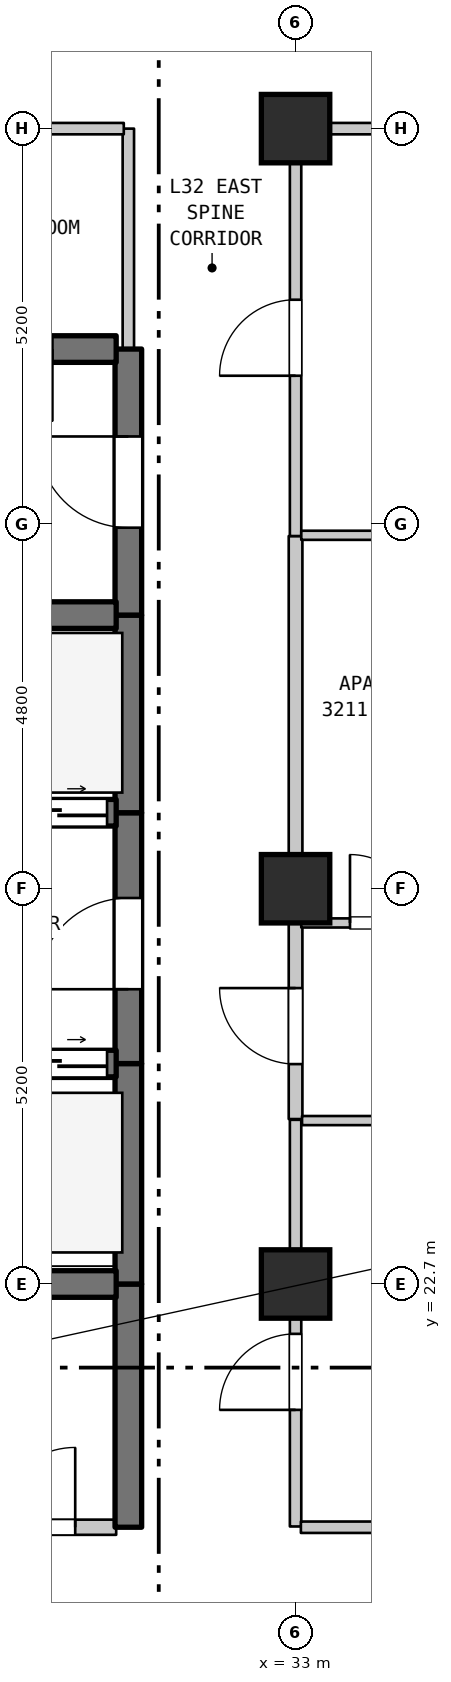
"""IFC4 building model, lengths in metres.
Left out: names, types, materials, properties, quantities, classifications, styles, units other than length and angle.
Written with IfcOpenShell. Run it as: python <this file> out.ifc"""

import sys

from ifc_helpers import new_model, si_unit, direction, frame, frame_2d, origin, origin_2d, place, context, subcontext, project, spatial, rectangle, extrude, element, fill, save


model = new_model("IFC4")
c1 = context("Model", 3, precision=1e-05, world=origin(), true_north=direction((0.0, 1.0)))
c2 = subcontext(c1, "Body", "Model", "MODEL_VIEW")
j1 = project(units=[si_unit("LENGTHUNIT", "METRE"), si_unit("PLANEANGLEUNIT", "RADIAN")], contexts=[c1])
p1 = place(None, origin())
s1 = spatial("IfcSite", under=j1, at=p1, CompositionType="ELEMENT")
p2 = place(p1, origin())
s2 = spatial("IfcBuilding", under=s1, at=p2, CompositionType="ELEMENT")
p3 = place(p2, frame((0.0, 0.0, 133.5)))
s3 = spatial("IfcBuildingStorey", under=s2, at=p3, CompositionType="ELEMENT", Elevation=133.5)
for number, where, z_axis, x_axis in (
    (1, (33.0, 22.7, 0.0), (0.0, 0.0, 1.0), (1.0, 0.0, 0.0)),
    (2, (33.0, 27.9, 0.0), (0.0, 0.0, 1.0), (1.0, 0.0, 0.0)),
    (3, (33.0, 37.9, 0.0), (0.0, 0.0, 1.0), (1.0, 0.0, 0.0)),
):
    element("IfcColumn", number, at=place(p3, frame(where, z_axis=z_axis, x_axis=x_axis)), inside=s3, PredefinedType="COLUMN", context=c2, shape_type="SweptSolid", body=[
        extrude(rectangle(XDim=0.9, YDim=0.9, at=origin_2d()), origin(), (0.0, 0.0, 1.0), 3.7),
    ])
p4 = place(p3, frame((30.8, 19.5, 0.0), z_axis=(0.0, 0.0, 1.0), x_axis=(0.0, 1.0, 0.0)))
e4 = element("IfcWall", 4, at=p4, inside=s3, PredefinedType="SHEAR", context=c2, shape_type="SweptSolid", body=[
    extrude(rectangle(XDim=3.2, YDim=0.35, at=frame_2d((1.6, 0.0))), origin(), (0.0, 0.0, 1.0), 3.385),
])
p5 = place(p3, frame((30.8, 22.7, 0.0), z_axis=(0.0, 0.0, 1.0), x_axis=(0.0, 1.0, 0.0)))
e5 = element("IfcWall", 5, at=p5, inside=s3, PredefinedType="SHEAR", context=c2, shape_type="SweptSolid", body=[
    extrude(rectangle(XDim=2.9, YDim=0.35, at=frame_2d((1.45, 0.0))), origin(), (0.0, 0.0, 1.0), 3.385),
])
p6 = place(p3, frame((30.8, 25.6, 0.0), z_axis=(0.0, 0.0, 1.0), x_axis=(0.0, 1.0, 0.0)))
e6 = element("IfcWall", 6, at=p6, inside=s3, PredefinedType="SHEAR", context=c2, shape_type="SweptSolid", body=[
    extrude(rectangle(XDim=3.3, YDim=0.35, at=frame_2d((1.65, 0.0))), origin(), (0.0, 0.0, 1.0), 3.385),
])
p7 = place(p6, frame((0.978, 0.0, 0.0)))
e7 = element("IfcOpeningElement", 7, at=p7, cuts=e6, PredefinedType="OPENING", context=c2, shape_type="SweptSolid", body=[
    extrude(rectangle(XDim=1.2, YDim=2.2, at=frame_2d((0.6, 1.1))), frame((0.0, 0.185, 0.0), z_axis=(0.0, -1.0, 0.0), x_axis=(1.0, 0.0, 0.0)), (0.0, 0.0, 1.0), 0.37),
])
p8 = place(p3, frame((30.8, 28.9, 0.0), z_axis=(0.0, 0.0, 1.0), x_axis=(0.0, 1.0, 0.0)))
e8 = element("IfcWall", 8, at=p8, inside=s3, PredefinedType="SHEAR", context=c2, shape_type="SweptSolid", body=[
    extrude(rectangle(XDim=2.6, YDim=0.35, at=frame_2d((1.3, 0.0))), origin(), (0.0, 0.0, 1.0), 3.385),
])
p9 = place(p3, frame((30.8, 31.5, 0.0), z_axis=(0.0, 0.0, 1.0), x_axis=(0.0, 1.0, 0.0)))
e9 = element("IfcWall", 9, at=p9, inside=s3, PredefinedType="SHEAR", context=c2, shape_type="SweptSolid", body=[
    extrude(rectangle(XDim=3.5, YDim=0.35, at=frame_2d((1.75, 0.0))), origin(), (0.0, 0.0, 1.0), 3.385),
])
p10 = place(p9, frame((1.15, 0.0, 0.0)))
e10 = element("IfcOpeningElement", 10, at=p10, cuts=e9, PredefinedType="OPENING", context=c2, shape_type="SweptSolid", body=[
    extrude(rectangle(XDim=1.2, YDim=2.2, at=frame_2d((0.6, 1.1))), frame((0.0, 0.185, 0.0), z_axis=(0.0, -1.0, 0.0), x_axis=(1.0, 0.0, 0.0)), (0.0, 0.0, 1.0), 0.37),
])
p11 = place(p3, frame((30.8, 35.0, 0.0), z_axis=(0.0, 0.0, 1.0), x_axis=(0.0, 1.0, 0.0)))
e11 = element("IfcWall", 11, at=p11, inside=s3, PredefinedType="STANDARD", context=c2, shape_type="SweptSolid", body=[
    extrude(rectangle(XDim=2.9, YDim=0.15, at=frame_2d((1.45, 0.0))), origin(), (0.0, 0.0, 1.0), 3.385),
])
p12 = place(p3, frame((33.0, 19.51, 0.0), z_axis=(0.0, 0.0, 1.0), x_axis=(0.0, 1.0, 0.0)))
e12 = element("IfcWall", 12, at=p12, inside=s3, PredefinedType="STANDARD", context=c2, shape_type="SweptSolid", body=[
    extrude(rectangle(XDim=5.35, YDim=0.15, at=frame_2d((2.675, 0.0))), origin(), (0.0, 0.0, 1.0), 2.935),
])
p13 = place(p12, frame((1.534, 0.0, 0.0)))
e13 = element("IfcOpeningElement", 13, at=p13, cuts=e12, PredefinedType="OPENING", context=c2, shape_type="SweptSolid", body=[
    extrude(rectangle(XDim=1.0, YDim=2.15, at=frame_2d((0.5, 1.075))), frame((0.0, 0.085, 0.0), z_axis=(0.0, -1.0, 0.0), x_axis=(1.0, 0.0, 0.0)), (0.0, 0.0, 1.0), 0.17),
])
p14 = place(p3, frame((33.0, 24.87, 0.0), z_axis=(0.0, 0.0, 1.0), x_axis=(0.0, 1.0, 0.0)))
e14 = element("IfcWall", 14, at=p14, inside=s3, PredefinedType="STANDARD", context=c2, shape_type="SweptSolid", body=[
    extrude(rectangle(XDim=2.6, YDim=0.18, at=frame_2d((1.3, 0.0))), origin(), (0.0, 0.0, 1.0), 2.935),
])
p15 = place(p14, frame((0.723, 0.0, 0.0)))
e15 = element("IfcOpeningElement", 15, at=p15, cuts=e14, PredefinedType="OPENING", context=c2, shape_type="SweptSolid", body=[
    extrude(rectangle(XDim=1.0, YDim=2.15, at=frame_2d((0.5, 1.075))), frame((0.0, 0.1, 0.0), z_axis=(0.0, -1.0, 0.0), x_axis=(1.0, 0.0, 0.0)), (0.0, 0.0, 1.0), 0.2),
])
p16 = place(p3, frame((33.0, 27.47, 0.0), z_axis=(0.0, 0.0, 1.0), x_axis=(0.0, 1.0, 0.0)))
e16 = element("IfcWall", 16, at=p16, inside=s3, PredefinedType="STANDARD", context=c2, shape_type="SweptSolid", body=[
    extrude(rectangle(XDim=5.07, YDim=0.18, at=frame_2d((2.535, 0.0))), origin(), (0.0, 0.0, 1.0), 2.885),
])
p17 = place(p3, frame((33.0, 32.54, 0.0), z_axis=(0.0, 0.0, 1.0), x_axis=(0.0, 1.0, 0.0)))
e17 = element("IfcWall", 17, at=p17, inside=s3, PredefinedType="STANDARD", context=c2, shape_type="SweptSolid", body=[
    extrude(rectangle(XDim=5.36, YDim=0.15, at=frame_2d((2.68, 0.0))), origin(), (0.0, 0.0, 1.0), 2.885),
])
p18 = place(p17, frame((2.109, 0.0, 0.0)))
e18 = element("IfcOpeningElement", 18, at=p18, cuts=e17, PredefinedType="OPENING", context=c2, shape_type="SweptSolid", body=[
    extrude(rectangle(XDim=1.0, YDim=2.15, at=frame_2d((0.5, 1.075))), frame((0.0, 0.085, 0.0), z_axis=(0.0, -1.0, 0.0), x_axis=(1.0, 0.0, 0.0)), (0.0, 0.0, 1.0), 0.17),
])
p19 = place(p3, frame((28.585, 19.5, 0.0), z_axis=(0.0, 0.0, 1.0), x_axis=(1.0, 0.0, 0.0)))
e19 = element("IfcWall", 19, at=p19, inside=s3, PredefinedType="STANDARD", context=c2, shape_type="SweptSolid", body=[
    extrude(rectangle(XDim=2.055, YDim=0.2, at=frame_2d((1.027, 0.0))), origin(), (0.0, 0.0, 1.0), 3.385),
])
p20 = place(p19, frame((0.466, 0.0, 0.0)))
e20 = element("IfcOpeningElement", 20, at=p20, cuts=e19, PredefinedType="OPENING", context=c2, shape_type="SweptSolid", body=[
    extrude(rectangle(XDim=1.05, YDim=2.15, at=frame_2d((0.525, 1.075))), frame((0.0, 0.11, 0.0), z_axis=(0.0, -1.0, 0.0), x_axis=(1.0, 0.0, 0.0)), (0.0, 0.0, 1.0), 0.22),
])
p21 = place(p3, frame((33.07, 19.5, 0.0), z_axis=(0.0, 0.0, 1.0), x_axis=(1.0, 0.0, 0.0)))
e21 = element("IfcWall", 21, at=p21, inside=s3, PredefinedType="STANDARD", context=c2, shape_type="SweptSolid", body=[
    extrude(rectangle(XDim=21.51, YDim=0.15, at=frame_2d((10.755, 0.0))), origin(), (0.0, 0.0, 1.0), 3.385),
])
p22 = place(p21, frame((10.185, 0.0, 0.0)))
e22 = element("IfcOpeningElement", 22, at=p22, cuts=e21, PredefinedType="OPENING", context=c2, shape_type="SweptSolid", body=[
    extrude(rectangle(XDim=1.0, YDim=2.15, at=frame_2d((0.5, 1.075))), frame((0.0, 0.085, 0.0), z_axis=(0.0, -1.0, 0.0), x_axis=(1.0, 0.0, 0.0)), (0.0, 0.0, 1.0), 0.17),
])
p23 = place(p3, frame((28.585, 22.7, 0.0), z_axis=(0.0, 0.0, 1.0), x_axis=(1.0, 0.0, 0.0)))
e23 = element("IfcWall", 23, at=p23, inside=s3, PredefinedType="SHEAR", context=c2, shape_type="SweptSolid", body=[
    extrude(rectangle(XDim=2.055, YDim=0.35, at=frame_2d((1.027, 0.0))), origin(), (0.0, 0.0, 1.0), 3.385),
])
p24 = place(p3, frame((33.085, 24.85, 0.0), z_axis=(0.0, 0.0, 1.0), x_axis=(1.0, 0.0, 0.0)))
e24 = element("IfcWall", 24, at=p24, inside=s3, PredefinedType="PARTITIONING", context=c2, shape_type="SweptSolid", body=[
    extrude(rectangle(XDim=23.905, YDim=0.12, at=frame_2d((11.953, 0.0))), origin(), (0.0, 0.0, 1.0), 3.385),
])
p25 = place(p3, frame((27.46, 25.6, 0.0), z_axis=(0.0, 0.0, 1.0), x_axis=(1.0, 0.0, 0.0)))
e25 = element("IfcWall", 25, at=p25, inside=s3, PredefinedType="SHEAR", context=c2, shape_type="SweptSolid", body=[
    extrude(rectangle(XDim=3.18, YDim=0.35, at=frame_2d((1.59, 0.0))), origin(), (0.0, 0.0, 1.0), 3.385),
])
p26 = place(p25, frame((0.12, 0.0, 0.0)))
e26 = element("IfcOpeningElement", 26, at=p26, cuts=e25, PredefinedType="OPENING", context=c2, shape_type="SweptSolid", body=[
    extrude(rectangle(XDim=1.25, YDim=2.2, at=frame_2d((0.625, 1.1))), frame((0.0, 0.185, 0.0), z_axis=(0.0, -1.0, 0.0), x_axis=(1.0, 0.0, 0.0)), (0.0, 0.0, 1.0), 0.37),
])
p27 = place(p25, frame((1.81, 0.0, 0.0)))
e27 = element("IfcOpeningElement", 27, at=p27, cuts=e25, PredefinedType="OPENING", context=c2, shape_type="SweptSolid", body=[
    extrude(rectangle(XDim=1.25, YDim=2.2, at=frame_2d((0.625, 1.1))), frame((0.0, 0.185, 0.0), z_axis=(0.0, -1.0, 0.0), x_axis=(1.0, 0.0, 0.0)), (0.0, 0.0, 1.0), 0.37),
])
p28 = place(p3, frame((33.075, 27.45, 0.0), z_axis=(0.0, 0.0, 1.0), x_axis=(1.0, 0.0, 0.0)))
e28 = element("IfcWall", 28, at=p28, inside=s3, PredefinedType="PARTITIONING", context=c2, shape_type="SweptSolid", body=[
    extrude(rectangle(XDim=2.364, YDim=0.12, at=frame_2d((1.182, 0.0))), origin(), (0.0, 0.0, 1.0), 3.385),
])
p29 = place(p28, frame((0.641, 0.0, 0.0)))
e29 = element("IfcOpeningElement", 29, at=p29, cuts=e28, PredefinedType="OPENING", context=c2, shape_type="SweptSolid", body=[
    extrude(rectangle(XDim=0.9, YDim=2.15, at=frame_2d((0.45, 1.075))), frame((0.0, 0.07, 0.0), z_axis=(0.0, -1.0, 0.0), x_axis=(1.0, 0.0, 0.0)), (0.0, 0.0, 1.0), 0.14),
])
p30 = place(p3, frame((27.46, 28.9, 0.0), z_axis=(0.0, 0.0, 1.0), x_axis=(1.0, 0.0, 0.0)))
e30 = element("IfcWall", 30, at=p30, inside=s3, PredefinedType="SHEAR", context=c2, shape_type="SweptSolid", body=[
    extrude(rectangle(XDim=3.18, YDim=0.35, at=frame_2d((1.59, 0.0))), origin(), (0.0, 0.0, 1.0), 3.385),
])
p31 = place(p30, frame((0.12, 0.0, 0.0)))
e31 = element("IfcOpeningElement", 31, at=p31, cuts=e30, PredefinedType="OPENING", context=c2, shape_type="SweptSolid", body=[
    extrude(rectangle(XDim=1.25, YDim=2.2, at=frame_2d((0.625, 1.1))), frame((0.0, 0.185, 0.0), z_axis=(0.0, -1.0, 0.0), x_axis=(1.0, 0.0, 0.0)), (0.0, 0.0, 1.0), 0.37),
])
p32 = place(p30, frame((1.81, 0.0, 0.0)))
e32 = element("IfcOpeningElement", 32, at=p32, cuts=e30, PredefinedType="OPENING", context=c2, shape_type="SweptSolid", body=[
    extrude(rectangle(XDim=1.25, YDim=2.2, at=frame_2d((0.625, 1.1))), frame((0.0, 0.185, 0.0), z_axis=(0.0, -1.0, 0.0), x_axis=(1.0, 0.0, 0.0)), (0.0, 0.0, 1.0), 0.37),
])
p33 = place(p3, frame((27.46, 31.5, 0.0), z_axis=(0.0, 0.0, 1.0), x_axis=(1.0, 0.0, 0.0)))
e33 = element("IfcWall", 33, at=p33, inside=s3, PredefinedType="SHEAR", context=c2, shape_type="SweptSolid", body=[
    extrude(rectangle(XDim=3.18, YDim=0.35, at=frame_2d((1.59, 0.0))), origin(), (0.0, 0.0, 1.0), 3.385),
])
p34 = place(p3, frame((33.075, 32.55, 0.0), z_axis=(0.0, 0.0, 1.0), x_axis=(1.0, 0.0, 0.0)))
e34 = element("IfcWall", 34, at=p34, inside=s3, PredefinedType="PARTITIONING", context=c2, shape_type="SweptSolid", body=[
    extrude(rectangle(XDim=2.364, YDim=0.12, at=frame_2d((1.182, 0.0))), origin(), (0.0, 0.0, 1.0), 3.385),
])
p35 = place(p3, frame((28.045, 35.0, 0.0), z_axis=(0.0, 0.0, 1.0), x_axis=(1.0, 0.0, 0.0)))
e35 = element("IfcWall", 35, at=p35, inside=s3, PredefinedType="SHEAR", context=c2, shape_type="SweptSolid", body=[
    extrude(rectangle(XDim=2.595, YDim=0.35, at=frame_2d((1.297, 0.0))), origin(), (0.0, 0.0, 1.0), 3.385),
])
p36 = place(p35, frame((0.806, 0.0, 0.0)))
e36 = element("IfcOpeningElement", 36, at=p36, cuts=e35, PredefinedType="OPENING", context=c2, shape_type="SweptSolid", body=[
    extrude(rectangle(XDim=0.95, YDim=2.15, at=frame_2d((0.475, 1.075))), frame((0.0, 0.185, 0.0), z_axis=(0.0, -1.0, 0.0), x_axis=(1.0, 0.0, 0.0)), (0.0, 0.0, 1.0), 0.37),
])
p37 = place(p3, frame((28.045, 37.9, 0.0), z_axis=(0.0, 0.0, 1.0), x_axis=(1.0, 0.0, 0.0)))
e37 = element("IfcWall", 37, at=p37, inside=s3, PredefinedType="STANDARD", context=c2, shape_type="SweptSolid", body=[
    extrude(rectangle(XDim=2.695, YDim=0.15, at=frame_2d((1.348, 0.0))), origin(), (0.0, 0.0, 1.0), 2.885),
])
p38 = place(p3, frame((33.06, 37.9, 0.0), z_axis=(0.0, 0.0, 1.0), x_axis=(1.0, 0.0, 0.0)))
e38 = element("IfcWall", 38, at=p38, inside=s3, PredefinedType="STANDARD", context=c2, shape_type="SweptSolid", body=[
    extrude(rectangle(XDim=11.879, YDim=0.15, at=frame_2d((5.939, 0.0))), origin(), (0.0, 0.0, 1.0), 3.385),
])
p39 = place(p38, frame((5.439, 0.0, 0.0)))
e39 = element("IfcOpeningElement", 39, at=p39, cuts=e38, PredefinedType="OPENING", context=c2, shape_type="SweptSolid", body=[
    extrude(rectangle(XDim=1.0, YDim=2.15, at=frame_2d((0.5, 1.075))), frame((0.0, 0.085, 0.0), z_axis=(0.0, -1.0, 0.0), x_axis=(1.0, 0.0, 0.0)), (0.0, 0.0, 1.0), 0.17),
])
p40 = place(p7, origin())
e40 = element("IfcDoor", 40, at=p40, inside=s3, OperationType="SINGLE_SWING_LEFT", PredefinedType="DOOR", context=c2, shape_type="SweptSolid", body=[
    extrude(rectangle(XDim=1.2, YDim=2.2, at=frame_2d((0.6, 1.1))), frame((0.0, 0.025, 0.0), z_axis=(0.0, -1.0, 0.0), x_axis=(1.0, 0.0, 0.0)), (0.0, 0.0, 1.0), 0.05),
])
fill(e7, e40)
p41 = place(p10, origin())
e41 = element("IfcDoor", 41, at=p41, inside=s3, OperationType="SINGLE_SWING_RIGHT", PredefinedType="DOOR", context=c2, shape_type="SweptSolid", body=[
    extrude(rectangle(XDim=1.2, YDim=2.2, at=frame_2d((0.6, 1.1))), frame((0.0, 0.025, 0.0), z_axis=(0.0, -1.0, 0.0), x_axis=(1.0, 0.0, 0.0)), (0.0, 0.0, 1.0), 0.05),
])
fill(e10, e41)
p42 = place(p13, origin())
e42 = element("IfcDoor", 42, at=p42, inside=s3, OperationType="SINGLE_SWING_LEFT", PredefinedType="DOOR", context=c2, shape_type="SweptSolid", body=[
    extrude(rectangle(XDim=1.0, YDim=2.15, at=frame_2d((0.5, 1.075))), frame((0.0, 0.025, 0.0), z_axis=(0.0, -1.0, 0.0), x_axis=(1.0, 0.0, 0.0)), (0.0, 0.0, 1.0), 0.05),
])
fill(e13, e42)
p43 = place(p15, origin())
e43 = element("IfcDoor", 43, at=p43, inside=s3, OperationType="SINGLE_SWING_RIGHT", PredefinedType="DOOR", context=c2, shape_type="SweptSolid", body=[
    extrude(rectangle(XDim=1.0, YDim=2.15, at=frame_2d((0.5, 1.075))), frame((0.0, 0.025, 0.0), z_axis=(0.0, -1.0, 0.0), x_axis=(1.0, 0.0, 0.0)), (0.0, 0.0, 1.0), 0.05),
])
fill(e15, e43)
p44 = place(p18, origin())
e44 = element("IfcDoor", 44, at=p44, inside=s3, OperationType="SINGLE_SWING_LEFT", PredefinedType="DOOR", context=c2, shape_type="SweptSolid", body=[
    extrude(rectangle(XDim=1.0, YDim=2.15, at=frame_2d((0.5, 1.075))), frame((0.0, 0.025, 0.0), z_axis=(0.0, -1.0, 0.0), x_axis=(1.0, 0.0, 0.0)), (0.0, 0.0, 1.0), 0.05),
])
fill(e18, e44)
p45 = place(p20, origin())
e45 = element("IfcDoor", 45, at=p45, inside=s3, OperationType="SINGLE_SWING_RIGHT", PredefinedType="DOOR", context=c2, shape_type="SweptSolid", body=[
    extrude(rectangle(XDim=1.05, YDim=2.15, at=frame_2d((0.525, 1.075))), frame((0.0, 0.025, 0.0), z_axis=(0.0, -1.0, 0.0), x_axis=(1.0, 0.0, 0.0)), (0.0, 0.0, 1.0), 0.05),
])
fill(e20, e45)
p46 = place(p27, origin())
e46 = element("IfcDoor", 46, at=p46, inside=s3, OperationType="DOUBLE_DOOR_SLIDING", PredefinedType="DOOR", context=c2, shape_type="SweptSolid", body=[
    extrude(rectangle(XDim=1.25, YDim=2.2, at=frame_2d((0.625, 1.1))), frame((0.0, 0.025, 0.0), z_axis=(0.0, -1.0, 0.0), x_axis=(1.0, 0.0, 0.0)), (0.0, 0.0, 1.0), 0.05),
])
fill(e27, e46)
p47 = place(p29, origin())
e47 = element("IfcDoor", 47, at=p47, inside=s3, OperationType="SINGLE_SWING_LEFT", PredefinedType="DOOR", context=c2, shape_type="SweptSolid", body=[
    extrude(rectangle(XDim=0.9, YDim=2.15, at=frame_2d((0.45, 1.075))), frame((0.0, 0.025, 0.0), z_axis=(0.0, -1.0, 0.0), x_axis=(1.0, 0.0, 0.0)), (0.0, 0.0, 1.0), 0.05),
])
fill(e29, e47)
p48 = place(p32, origin())
e48 = element("IfcDoor", 48, at=p48, inside=s3, OperationType="DOUBLE_DOOR_SLIDING", PredefinedType="DOOR", context=c2, shape_type="SweptSolid", body=[
    extrude(rectangle(XDim=1.25, YDim=2.2, at=frame_2d((0.625, 1.1))), frame((0.0, 0.025, 0.0), z_axis=(0.0, -1.0, 0.0), x_axis=(1.0, 0.0, 0.0)), (0.0, 0.0, 1.0), 0.05),
])
fill(e32, e48)
p49 = place(p36, frame((0.95, 0.0, 0.0), z_axis=(0.0, 0.0, 1.0), x_axis=(-1.0, 0.0, 0.0)))
e49 = element("IfcDoor", 49, at=p49, inside=s3, OperationType="SINGLE_SWING_RIGHT", PredefinedType="DOOR", context=c2, shape_type="SweptSolid", body=[
    extrude(rectangle(XDim=0.95, YDim=2.15, at=frame_2d((0.475, 1.075))), frame((0.0, 0.025, 0.0), z_axis=(0.0, -1.0, 0.0), x_axis=(1.0, 0.0, 0.0)), (0.0, 0.0, 1.0), 0.05),
])
fill(e36, e49)
save(model, sys.argv[1])
